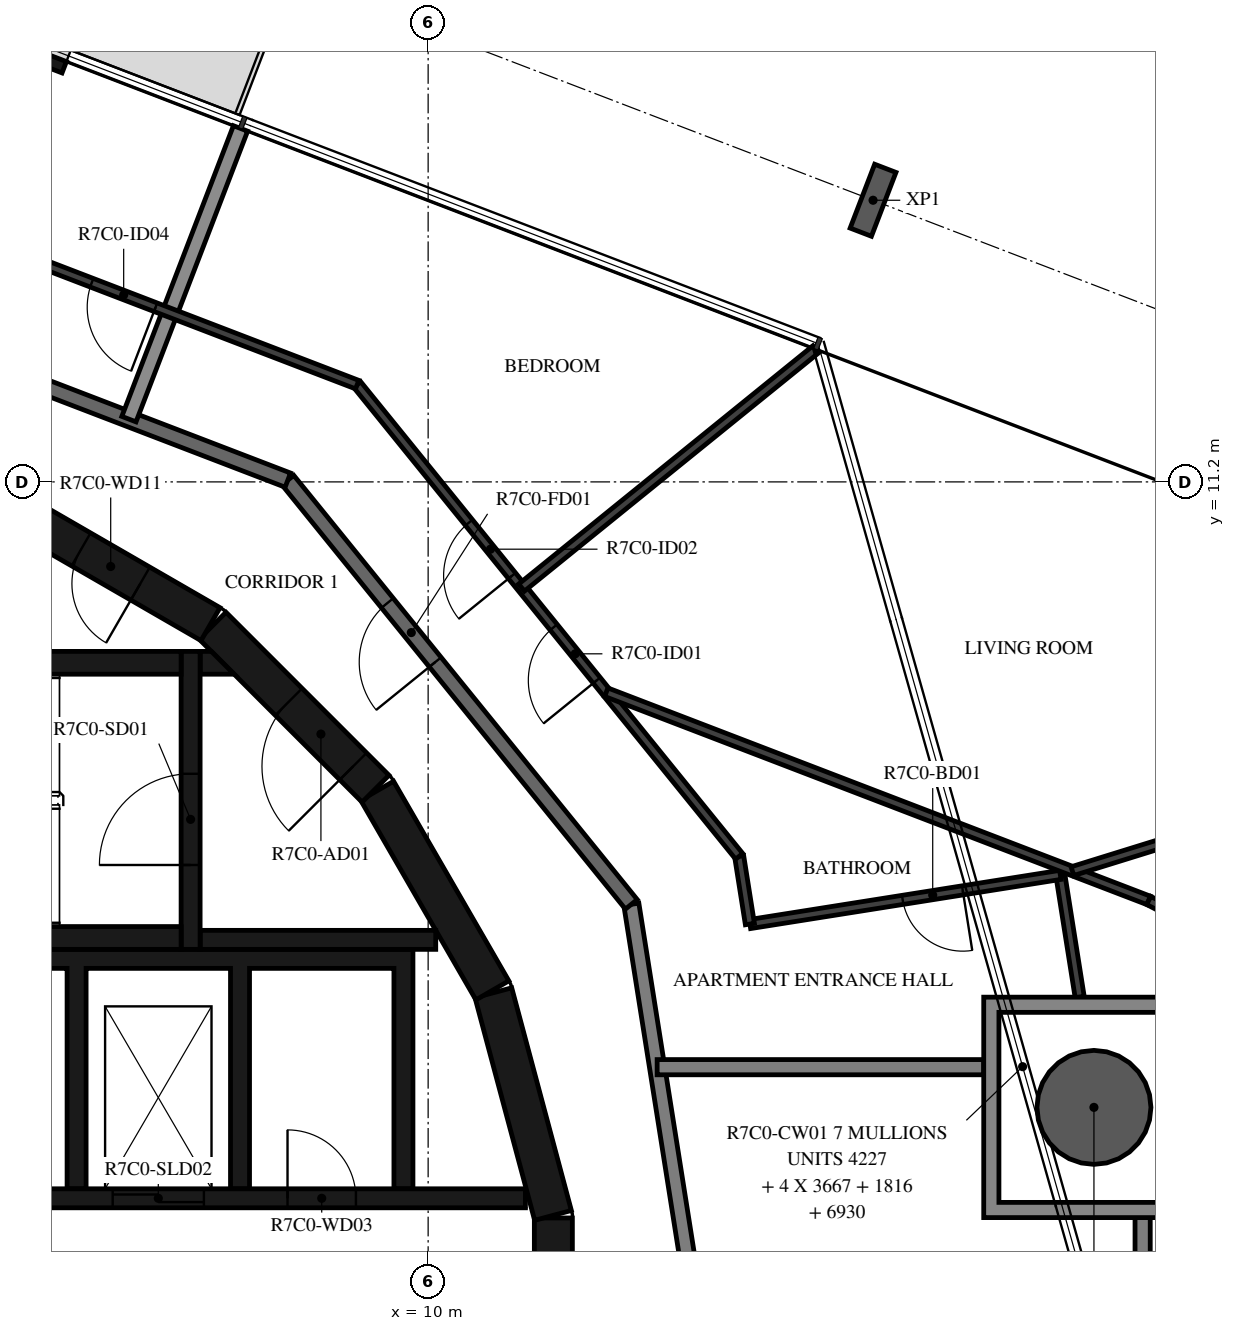
"""IFC4 building model, lengths in metres.
Left out: names, types, materials, properties, quantities, classifications, styles, units other than length and angle.
Written with IfcOpenShell. Run it as: python <this file> out.ifc"""

import sys

from ifc_helpers import new_model, si_unit, direction, frame, frame_2d, origin, origin_2d, place, context, subcontext, project, spatial, polyline, rectangle, hollow_circle, i_section, outline, extrude, element, fill, save


model = new_model("IFC4")
c1 = context("Model", 3, precision=1e-05, world=origin(), true_north=direction((0.0, 1.0)))
c2 = subcontext(c1, "Body", "Model", "MODEL_VIEW")
j1 = project(units=[si_unit("LENGTHUNIT", "METRE"), si_unit("PLANEANGLEUNIT", "RADIAN")], contexts=[c1])
p1 = place(None, origin())
s1 = spatial("IfcSite", under=j1, at=p1, CompositionType="ELEMENT")
p2 = place(p1, origin())
s2 = spatial("IfcBuilding", under=s1, at=p2, CompositionType="ELEMENT")
p3 = place(p2, frame((0.0, 0.0, 284.4)))
s3 = spatial("IfcBuildingStorey", under=s2, at=p3, CompositionType="ELEMENT", Elevation=284.4)
p4 = place(p3, frame((18.76, 2.971, -0.38), z_axis=(0.0, 0.0, 1.0), x_axis=(1.0, 0.0, 0.0)))
e1 = element("IfcColumn", 1, at=p4, inside=s3, PredefinedType="COLUMN", context=c2, shape_type="SweptSolid", body=[
    extrude(hollow_circle(Radius=0.75, WallThickness=0.035, at=origin_2d()), origin(), (0.0, 0.0, 1.0), 3.5),
])
p5 = place(p3, frame((15.854, 14.905, -0.38), z_axis=(0.0, 0.0, 1.0), x_axis=(0.933580354843, -0.35836813621, 0.0)))
e2 = element("IfcColumn", 2, at=p5, inside=s3, PredefinedType="COLUMN", context=c2, shape_type="SweptSolid", body=[
    extrude(i_section(OverallWidth=0.3, OverallDepth=0.9, WebThickness=0.019, FlangeThickness=0.035, FilletRadius=0.03, at=origin_2d()), origin(), (0.0, 0.0, 1.0), 3.5),
])
p6 = place(p3, frame((5.212, 16.655, 0.0), z_axis=(0.0, 0.0, 1.0), x_axis=(-0.933579413923, 0.358370587381, 0.0)))
e3 = element("IfcWall", 3, at=p6, inside=s3, PredefinedType="STANDARD", context=c2, shape_type="SweptSolid", body=[
    extrude(rectangle(XDim=3.2, YDim=0.16, at=frame_2d((1.6, 0.0))), origin(), (0.0, 0.0, 1.0), 3.12),
])
p7 = place(p6, frame((0.4, 0.0, 0.0)))
e4 = element("IfcOpeningElement", 4, at=p7, cuts=e3, PredefinedType="OPENING", context=c2, shape_type="SweptSolid", body=[
    extrude(rectangle(XDim=2.4, YDim=2.4, at=frame_2d((1.2, 1.2))), frame((0.0, 0.09, 0.0), z_axis=(0.0, -1.0, 0.0), x_axis=(1.0, 0.0, 0.0)), (0.0, 0.0, 1.0), 0.18),
])
p8 = place(p3, frame((11.647, -1.516, 0.0), z_axis=(0.0, 0.0, 1.0), x_axis=(0.0, 1.0, 0.0)))
e5 = element("IfcWall", 5, at=p8, inside=s3, PredefinedType="SHEAR", context=c2, shape_type="SweptSolid", body=[
    extrude(rectangle(XDim=3.033, YDim=0.5, at=frame_2d((1.516, 0.0))), origin(), (0.0, 0.0, 1.0), 3.12),
])
p9 = place(p8, frame((0.616, 0.0, 0.0)))
e6 = element("IfcOpeningElement", 6, at=p9, cuts=e5, PredefinedType="OPENING", context=c2, shape_type="SweptSolid", body=[
    extrude(rectangle(XDim=1.8, YDim=2.1, at=frame_2d((0.9, 1.05))), frame((0.0, 0.26, 0.0), z_axis=(0.0, -1.0, 0.0), x_axis=(1.0, 0.0, 0.0)), (0.0, 0.0, 1.0), 0.52),
])
for number, where, z_axis, x_axis in (
    (7, (11.643, 1.55, 0.0), (0.0, 0.0, 1.0), (-0.259, 0.966, 0.0)),
    (8, (10.845, 4.51, 0.0), (0.0, 0.0, 1.0), (-0.5, 0.866, 0.0)),
):
    element("IfcWall", number, at=place(p3, frame(where, z_axis=z_axis, x_axis=x_axis)), inside=s3, PredefinedType="SHEAR", context=c2, shape_type="SweptSolid", body=[
        extrude(rectangle(XDim=3.033, YDim=0.5, at=frame_2d((1.516, 0.0))), origin(), (0.0, 0.0, 1.0), 3.12),
    ])
p10 = place(p3, frame((9.308, 7.164, 0.0), z_axis=(0.0, 0.0, 1.0), x_axis=(-0.707106781187, 0.707106781187, 0.0)))
e9 = element("IfcWall", 9, at=p10, inside=s3, PredefinedType="SHEAR", context=c2, shape_type="SweptSolid", body=[
    extrude(rectangle(XDim=3.032, YDim=0.5, at=frame_2d((1.516, 0.0))), origin(), (0.0, 0.0, 1.0), 3.12),
])
p11 = place(p10, frame((0.416, 0.0, 0.0)))
e10 = element("IfcOpeningElement", 10, at=p11, cuts=e9, PredefinedType="OPENING", context=c2, shape_type="SweptSolid", body=[
    extrude(rectangle(XDim=1.2, YDim=2.1, at=frame_2d((0.6, 1.05))), frame((0.0, 0.26, 0.0), z_axis=(0.0, -1.0, 0.0), x_axis=(1.0, 0.0, 0.0)), (0.0, 0.0, 1.0), 0.52),
])
p12 = place(p3, frame((7.137, 9.329, 0.0), z_axis=(0.0, 0.0, 1.0), x_axis=(-0.865975092491, 0.500087131594, 0.0)))
e11 = element("IfcWall", 11, at=p12, inside=s3, PredefinedType="SHEAR", context=c2, shape_type="SweptSolid", body=[
    extrude(rectangle(XDim=3.033, YDim=0.5, at=frame_2d((1.516, 0.0))), origin(), (0.0, 0.0, 1.0), 3.12),
])
p13 = place(p12, frame((1.066, 0.0, 0.0)))
e12 = element("IfcOpeningElement", 12, at=p13, cuts=e11, PredefinedType="OPENING", context=c2, shape_type="SweptSolid", body=[
    extrude(rectangle(XDim=0.9, YDim=2.1, at=frame_2d((0.45, 1.05))), frame((0.0, 0.26, 0.0), z_axis=(0.0, -1.0, 0.0), x_axis=(1.0, 0.0, 0.0)), (0.0, 0.0, 1.0), 0.52),
])
for number, where, z_axis, x_axis in (
    (13, (0.0, 5.2, 0.0), (0.0, 0.0, 1.0), (1.0, 0.0, 0.0)),
    (14, (0.0, 8.82, 0.0), (0.0, 0.0, 1.0), (1.0, 0.0, 0.0)),
):
    element("IfcWall", number, at=place(p3, frame(where, z_axis=z_axis, x_axis=x_axis)), inside=s3, PredefinedType="SHEAR", context=c2, shape_type="SweptSolid", body=[
        extrude(rectangle(XDim=6.75, YDim=0.3, at=frame_2d((3.375, 0.0))), origin(), (0.0, 0.0, 1.0), 3.12),
    ])
p14 = place(p3, frame((6.875, 5.05, 0.0), z_axis=(0.0, 0.0, 1.0), x_axis=(0.0, 1.0, 0.0)))
e15 = element("IfcWall", 15, at=p14, inside=s3, PredefinedType="SHEAR", context=c2, shape_type="SweptSolid", body=[
    extrude(rectangle(XDim=3.92, YDim=0.25, at=frame_2d((1.96, 0.0))), origin(), (0.0, 0.0, 1.0), 3.12),
])
p15 = place(p14, frame((1.11, 0.0, 0.0)))
e16 = element("IfcOpeningElement", 16, at=p15, cuts=e15, PredefinedType="OPENING", context=c2, shape_type="SweptSolid", body=[
    extrude(rectangle(XDim=1.2, YDim=2.1, at=frame_2d((0.6, 1.05))), frame((0.0, 0.135, 0.0), z_axis=(0.0, -1.0, 0.0), x_axis=(1.0, 0.0, 0.0)), (0.0, 0.0, 1.0), 0.27),
])
p16 = place(p3, frame((7.0, 5.175, 0.0), z_axis=(0.0, 0.0, 1.0), x_axis=(1.0, 0.0, 0.0)))
e17 = element("IfcWall", 17, at=p16, inside=s3, PredefinedType="SHEAR", context=c2, shape_type="SweptSolid", body=[
    extrude(rectangle(XDim=3.1, YDim=0.25, at=frame_2d((1.55, 0.0))), origin(), (0.0, 0.0, 1.0), 3.12),
])
p17 = place(p3, origin())
e18 = element("IfcWall", 18, at=p17, inside=s3, PredefinedType="SHEAR", context=c2, shape_type="SweptSolid", body=[
    extrude(outline(polyline([(7.448, 8.67), (7.0, 8.67), (7.0, 8.97), (7.148, 8.97), (7.448, 8.67)])), origin(), (0.0, 0.0, 1.0), 3.12),
])
p18 = place(p3, origin())
e19 = element("IfcWall", 19, at=p18, inside=s3, PredefinedType="SHEAR", context=c2, shape_type="SweptSolid", body=[
    extrude(outline(polyline([(-9.8, 1.9), (-9.55, 1.9), (-9.55, 4.8), (-5.5, 4.8), (-5.5, 1.9), (-5.25, 1.9), (-5.25, 4.8), (3.1, 4.8), (3.1, 1.9), (3.35, 1.9), (3.35, 4.8), (5.25, 4.8), (5.25, 1.9), (5.5, 1.9), (5.5, 4.8), (7.4, 4.8), (7.4, 1.9), (7.65, 1.9), (7.65, 4.8), (9.55, 4.8), (9.55, 1.9), (9.8, 1.9), (9.8, 4.8), (9.8, 5.05), (-9.8, 5.05), (-9.8, 4.8), (-9.8, 1.9)])), origin(), (0.0, 0.0, 1.0), 3.12),
])
p19 = place(p3, frame((3.35, 1.775, 0.0), z_axis=(0.0, 0.0, 1.0), x_axis=(1.0, 0.0, 0.0)))
e20 = element("IfcWall", 20, at=p19, inside=s3, PredefinedType="SHEAR", context=c2, shape_type="SweptSolid", body=[
    extrude(rectangle(XDim=7.93, YDim=0.25, at=frame_2d((3.965, 0.0))), origin(), (0.0, 0.0, 1.0), 3.12),
])
p20 = place(p19, frame((0.35, 0.0, 0.0)))
e21 = element("IfcOpeningElement", 21, at=p20, cuts=e20, PredefinedType="OPENING", context=c2, shape_type="SweptSolid", body=[
    extrude(rectangle(XDim=1.2, YDim=2.4, at=frame_2d((0.6, 1.2))), frame((0.0, 0.135, 0.0), z_axis=(0.0, -1.0, 0.0), x_axis=(1.0, 0.0, 0.0)), (0.0, 0.0, 1.0), 0.27),
])
p21 = place(p19, frame((2.5, 0.0, 0.0)))
e22 = element("IfcOpeningElement", 22, at=p21, cuts=e20, PredefinedType="OPENING", context=c2, shape_type="SweptSolid", body=[
    extrude(rectangle(XDim=1.2, YDim=2.4, at=frame_2d((0.6, 1.2))), frame((0.0, 0.135, 0.0), z_axis=(0.0, -1.0, 0.0), x_axis=(1.0, 0.0, 0.0)), (0.0, 0.0, 1.0), 0.27),
])
p22 = place(p19, frame((4.8, 0.0, 0.0)))
e23 = element("IfcOpeningElement", 23, at=p22, cuts=e20, PredefinedType="OPENING", context=c2, shape_type="SweptSolid", body=[
    extrude(rectangle(XDim=0.9, YDim=2.1, at=frame_2d((0.45, 1.05))), frame((0.0, 0.135, 0.0), z_axis=(0.0, -1.0, 0.0), x_axis=(1.0, 0.0, 0.0)), (0.0, 0.0, 1.0), 0.27),
])
p23 = place(p3, frame((13.797, -1.45, 0.0), z_axis=(0.0, 0.0, 1.0), x_axis=(-0.156421704315, 0.987690361611, 0.0)))
e24 = element("IfcWall", 24, at=p23, inside=s3, PredefinedType="STANDARD", context=c2, shape_type="SweptSolid", body=[
    extrude(rectangle(XDim=7.181, YDim=0.2, at=frame_2d((3.591, 0.0))), origin(), (0.0, 0.0, 1.0), 3.12),
])
p24 = place(p3, frame((12.673, 5.643, 0.0), z_axis=(0.0, 0.0, 1.0), x_axis=(-0.629302871585, 0.777160148113, 0.0)))
e25 = element("IfcWall", 25, at=p24, inside=s3, PredefinedType="STANDARD", context=c2, shape_type="SweptSolid", body=[
    extrude(rectangle(XDim=7.181, YDim=0.2, at=frame_2d((3.59, 0.0))), origin(), (0.0, 0.0, 1.0), 3.12),
])
p25 = place(p24, frame((4.1, 0.0, 0.0)))
e26 = element("IfcOpeningElement", 26, at=p25, cuts=e25, PredefinedType="OPENING", context=c2, shape_type="SweptSolid", body=[
    extrude(rectangle(XDim=1.0, YDim=2.1, at=frame_2d((0.5, 1.05))), frame((0.0, 0.11, 0.0), z_axis=(0.0, -1.0, 0.0), x_axis=(1.0, 0.0, 0.0)), (0.0, 0.0, 1.0), 0.22),
])
p26 = place(p3, frame((8.154, 11.223, 0.0), z_axis=(0.0, 0.0, 1.0), x_axis=(-0.93359073609, 0.358341090983, 0.0)))
e27 = element("IfcWall", 27, at=p26, inside=s3, PredefinedType="STANDARD", context=c2, shape_type="SweptSolid", body=[
    extrude(rectangle(XDim=7.181, YDim=0.2, at=frame_2d((3.59, 0.0))), origin(), (0.0, 0.0, 1.0), 3.12),
])
p27 = place(p3, frame((17.309, 3.5, 0.0), z_axis=(0.0, 0.0, 1.0), x_axis=(-1.0, 0.0, 0.0)))
e28 = element("IfcWall", 28, at=p27, inside=s3, PredefinedType="STANDARD", context=c2, shape_type="SweptSolid", body=[
    extrude(rectangle(XDim=4.297, YDim=0.2, at=frame_2d((2.148, 0.0))), origin(), (0.0, 0.0, 1.0), 3.12),
])
p28 = place(p3, frame((19.4, -3.5, 0.0), z_axis=(0.0, 0.0, 1.0), x_axis=(0.0, 1.0, 0.0)))
e29 = element("IfcWall", 29, at=p28, inside=s3, PredefinedType="STANDARD", context=c2, shape_type="SweptSolid", body=[
    extrude(rectangle(XDim=5.021, YDim=0.2, at=frame_2d((2.511, 0.0))), origin(), (0.0, 0.0, 1.0), 3.12),
])
p29 = place(p3, frame((7.532, 15.85, 0.0), z_axis=(0.0, 0.0, 1.0), x_axis=(-0.358355996975, -0.933585014571, 0.0)))
e30 = element("IfcWall", 30, at=p29, inside=s3, PredefinedType="STANDARD", context=c2, shape_type="SweptSolid", body=[
    extrude(rectangle(XDim=4.096, YDim=0.2, at=frame_2d((2.048, 0.0))), origin(), (0.0, 0.0, 1.0), 2.73),
])
p30 = place(p3, frame((18.572, 4.421, 0.0), z_axis=(0.0, 0.0, 1.0), x_axis=(-0.156347444306, 0.987702119396, 0.0)))
e31 = element("IfcWall", 31, at=p30, inside=s3, PredefinedType="PARTITIONING", context=c2, shape_type="SweptSolid", body=[
    extrude(rectangle(XDim=1.629, YDim=0.12, at=frame_2d((0.814, 0.0))), origin(), (0.0, 0.0, 1.0), 3.12),
])
p31 = place(p3, frame((18.317, 6.03, 0.0), z_axis=(0.0, 0.0, 1.0), x_axis=(-0.9876848128, -0.156456737039, 0.0)))
e32 = element("IfcWall", 32, at=p31, inside=s3, PredefinedType="PARTITIONING", context=c2, shape_type="SweptSolid", body=[
    extrude(rectangle(XDim=4.135, YDim=0.12, at=frame_2d((2.068, 0.0))), origin(), (0.0, 0.0, 1.0), 3.12),
])
p32 = place(p31, frame((1.3, 0.0, 0.0)))
e33 = element("IfcOpeningElement", 33, at=p32, cuts=e32, PredefinedType="OPENING", context=c2, shape_type="SweptSolid", body=[
    extrude(rectangle(XDim=0.8, YDim=2.1, at=frame_2d((0.4, 1.05))), frame((0.0, 0.07, 0.0), z_axis=(0.0, -1.0, 0.0), x_axis=(1.0, 0.0, 0.0)), (0.0, 0.0, 1.0), 0.14),
])
p33 = place(p3, frame((14.233, 5.383, 0.0), z_axis=(0.0, 0.0, 1.0), x_axis=(-0.156365428504, 0.987699272435, 0.0)))
e34 = element("IfcWall", 34, at=p33, inside=s3, PredefinedType="PARTITIONING", context=c2, shape_type="SweptSolid", body=[
    extrude(rectangle(XDim=0.902, YDim=0.12, at=frame_2d((0.451, 0.0))), origin(), (0.0, 0.0, 1.0), 3.12),
])
p34 = place(p3, frame((14.092, 6.274, 0.0), z_axis=(0.0, 0.0, 1.0), x_axis=(-0.62933367237, 0.777135206268, 0.0)))
e35 = element("IfcWall", 35, at=p34, inside=s3, PredefinedType="PARTITIONING", context=c2, shape_type="SweptSolid", body=[
    extrude(rectangle(XDim=7.985, YDim=0.12, at=frame_2d((3.992, 0.0))), origin(), (0.0, 0.0, 1.0), 3.12),
])
p35 = place(p34, frame((2.978, 0.0, 0.0)))
e36 = element("IfcOpeningElement", 36, at=p35, cuts=e35, PredefinedType="OPENING", context=c2, shape_type="SweptSolid", body=[
    extrude(rectangle(XDim=0.9, YDim=2.1, at=frame_2d((0.45, 1.05))), frame((0.0, 0.07, 0.0), z_axis=(0.0, -1.0, 0.0), x_axis=(1.0, 0.0, 0.0)), (0.0, 0.0, 1.0), 0.14),
])
p36 = place(p34, frame((4.749, 0.0, 0.0)))
e37 = element("IfcOpeningElement", 37, at=p36, cuts=e35, PredefinedType="OPENING", context=c2, shape_type="SweptSolid", body=[
    extrude(rectangle(XDim=0.9, YDim=2.1, at=frame_2d((0.45, 1.05))), frame((0.0, 0.07, 0.0), z_axis=(0.0, -1.0, 0.0), x_axis=(1.0, 0.0, 0.0)), (0.0, 0.0, 1.0), 0.14),
])
p37 = place(p3, frame((9.067, 12.479, 0.0), z_axis=(0.0, 0.0, 1.0), x_axis=(-0.933579449035, 0.358370495911, 0.0)))
e38 = element("IfcWall", 38, at=p37, inside=s3, PredefinedType="PARTITIONING", context=c2, shape_type="SweptSolid", body=[
    extrude(rectangle(XDim=7.985, YDim=0.12, at=frame_2d((3.992, 0.0))), origin(), (0.0, 0.0, 1.0), 3.12),
])
p38 = place(p37, frame((2.841, 0.0, 0.0)))
e39 = element("IfcOpeningElement", 39, at=p38, cuts=e38, PredefinedType="OPENING", context=c2, shape_type="SweptSolid", body=[
    extrude(rectangle(XDim=0.9, YDim=2.1, at=frame_2d((0.45, 1.05))), frame((0.0, 0.07, 0.0), z_axis=(0.0, -1.0, 0.0), x_axis=(1.0, 0.0, 0.0)), (0.0, 0.0, 1.0), 0.14),
])
p39 = place(p3, frame((12.344, 8.433, 0.0), z_axis=(0.0, 0.0, 1.0), x_axis=(0.933573435176, -0.358386162029, 0.0)))
e40 = element("IfcWall", 40, at=p39, inside=s3, PredefinedType="PARTITIONING", context=c2, shape_type="SweptSolid", body=[
    extrude(rectangle(XDim=7.644, YDim=0.12, at=frame_2d((3.822, 0.0))), origin(), (0.0, 0.0, 1.0), 3.12),
])
p40 = place(p3, frame((19.48, 5.694, 0.0), z_axis=(0.0, 0.0, 1.0), x_axis=(0.885755816688, -0.464151519662, 0.0)))
e41 = element("IfcWall", 41, at=p40, inside=s3, PredefinedType="PARTITIONING", context=c2, shape_type="SweptSolid", body=[
    extrude(rectangle(XDim=0.947, YDim=0.12, at=frame_2d((0.473, 0.0))), origin(), (0.0, 0.0, 1.0), 3.12),
])
p41 = place(p3, frame((24.883, 8.066, 0.0), z_axis=(0.0, 0.0, 1.0), x_axis=(-0.955106049863, -0.296264127958, 0.0)))
e42 = element("IfcWall", 42, at=p41, inside=s3, PredefinedType="PARTITIONING", context=c2, shape_type="SweptSolid", body=[
    extrude(rectangle(XDim=6.708, YDim=0.12, at=frame_2d((3.354, 0.0))), origin(), (0.0, 0.0, 1.0), 3.12),
])
p42 = place(p41, frame((0.4, 0.0, 0.0)))
e43 = element("IfcOpeningElement", 43, at=p42, cuts=e42, PredefinedType="OPENING", context=c2, shape_type="SweptSolid", body=[
    extrude(rectangle(XDim=0.9, YDim=2.1, at=frame_2d((0.45, 1.05))), frame((0.0, 0.07, 0.0), z_axis=(0.0, -1.0, 0.0), x_axis=(1.0, 0.0, 0.0)), (0.0, 0.0, 1.0), 0.14),
])
p43 = place(p3, frame((15.101, 12.945, 0.0), z_axis=(0.0, 0.0, 1.0), x_axis=(-0.777178675378, -0.629279990575, 0.0)))
e44 = element("IfcWall", 44, at=p43, inside=s3, PredefinedType="PARTITIONING", context=c2, shape_type="SweptSolid", body=[
    extrude(rectangle(XDim=4.982, YDim=0.12, at=frame_2d((2.491, 0.0))), origin(), (0.0, 0.0, 1.0), 3.12),
])
p44 = place(p3, origin())
e45 = element("IfcWall", 45, at=p44, inside=s3, PredefinedType="STANDARD", context=c2, shape_type="SweptSolid", body=[
    extrude(outline(polyline([(20.209, 4.421), (20.209, 1.521), (17.309, 1.521), (17.309, 4.421), (20.209, 4.421)]), holes=[polyline([(17.51, 1.721), (20.01, 1.721), (20.01, 4.221), (17.51, 4.221), (17.51, 1.721)])]), origin(), (0.0, 0.0, 1.0), 3.12),
])
p45 = place(p15, origin())
e46 = element("IfcDoor", 46, at=p45, inside=s3, OperationType="SINGLE_SWING_LEFT", PredefinedType="DOOR", context=c2, shape_type="SweptSolid", body=[
    extrude(rectangle(XDim=1.2, YDim=2.1, at=frame_2d((0.6, 1.05))), frame((0.0, 0.025, 0.0), z_axis=(0.0, -1.0, 0.0), x_axis=(1.0, 0.0, 0.0)), (0.0, 0.0, 1.0), 0.05),
])
fill(e16, e46)
p46 = place(p11, origin())
e47 = element("IfcDoor", 47, at=p46, inside=s3, OperationType="SINGLE_SWING_RIGHT", PredefinedType="DOOR", context=c2, shape_type="SweptSolid", body=[
    extrude(rectangle(XDim=1.2, YDim=2.1, at=frame_2d((0.6, 1.05))), frame((0.0, 0.025, 0.0), z_axis=(0.0, -1.0, 0.0), x_axis=(1.0, 0.0, 0.0)), (0.0, 0.0, 1.0), 0.05),
])
fill(e10, e47)
p47 = place(p21, origin())
e48 = element("IfcDoor", 48, at=p47, inside=s3, OperationType="DOUBLE_DOOR_SLIDING", PredefinedType="DOOR", context=c2, shape_type="SweptSolid", body=[
    extrude(rectangle(XDim=1.2, YDim=2.4, at=frame_2d((0.6, 1.2))), frame((0.0, 0.025, 0.0), z_axis=(0.0, -1.0, 0.0), x_axis=(1.0, 0.0, 0.0)), (0.0, 0.0, 1.0), 0.05),
])
fill(e22, e48)
p48 = place(p22, origin())
e49 = element("IfcDoor", 49, at=p48, inside=s3, OperationType="SINGLE_SWING_LEFT", PredefinedType="DOOR", context=c2, shape_type="SweptSolid", body=[
    extrude(rectangle(XDim=0.9, YDim=2.1, at=frame_2d((0.45, 1.05))), frame((0.0, 0.025, 0.0), z_axis=(0.0, -1.0, 0.0), x_axis=(1.0, 0.0, 0.0)), (0.0, 0.0, 1.0), 0.05),
])
fill(e23, e49)
p49 = place(p13, origin())
e50 = element("IfcDoor", 50, at=p49, inside=s3, OperationType="SINGLE_SWING_LEFT", PredefinedType="DOOR", context=c2, shape_type="SweptSolid", body=[
    extrude(rectangle(XDim=0.9, YDim=2.1, at=frame_2d((0.45, 1.05))), frame((0.0, 0.025, 0.0), z_axis=(0.0, -1.0, 0.0), x_axis=(1.0, 0.0, 0.0)), (0.0, 0.0, 1.0), 0.05),
])
fill(e12, e50)
p50 = place(p25, origin())
e51 = element("IfcDoor", 51, at=p50, inside=s3, OperationType="SINGLE_SWING_LEFT", PredefinedType="DOOR", context=c2, shape_type="SweptSolid", body=[
    extrude(rectangle(XDim=1.0, YDim=2.1, at=frame_2d((0.5, 1.05))), frame((0.0, 0.025, 0.0), z_axis=(0.0, -1.0, 0.0), x_axis=(1.0, 0.0, 0.0)), (0.0, 0.0, 1.0), 0.05),
])
fill(e26, e51)
p51 = place(p32, origin())
e52 = element("IfcDoor", 52, at=p51, inside=s3, OperationType="SINGLE_SWING_LEFT", PredefinedType="DOOR", context=c2, shape_type="SweptSolid", body=[
    extrude(rectangle(XDim=0.8, YDim=2.1, at=frame_2d((0.4, 1.05))), frame((0.0, 0.025, 0.0), z_axis=(0.0, -1.0, 0.0), x_axis=(1.0, 0.0, 0.0)), (0.0, 0.0, 1.0), 0.05),
])
fill(e33, e52)
p52 = place(p35, origin())
e53 = element("IfcDoor", 53, at=p52, inside=s3, OperationType="SINGLE_SWING_LEFT", PredefinedType="DOOR", context=c2, shape_type="SweptSolid", body=[
    extrude(rectangle(XDim=0.9, YDim=2.1, at=frame_2d((0.45, 1.05))), frame((0.0, 0.025, 0.0), z_axis=(0.0, -1.0, 0.0), x_axis=(1.0, 0.0, 0.0)), (0.0, 0.0, 1.0), 0.05),
])
fill(e36, e53)
p53 = place(p36, origin())
e54 = element("IfcDoor", 54, at=p53, inside=s3, OperationType="SINGLE_SWING_LEFT", PredefinedType="DOOR", context=c2, shape_type="SweptSolid", body=[
    extrude(rectangle(XDim=0.9, YDim=2.1, at=frame_2d((0.45, 1.05))), frame((0.0, 0.025, 0.0), z_axis=(0.0, -1.0, 0.0), x_axis=(1.0, 0.0, 0.0)), (0.0, 0.0, 1.0), 0.05),
])
fill(e37, e54)
p54 = place(p38, origin())
e55 = element("IfcDoor", 55, at=p54, inside=s3, OperationType="SINGLE_SWING_LEFT", PredefinedType="DOOR", context=c2, shape_type="SweptSolid", body=[
    extrude(rectangle(XDim=0.9, YDim=2.1, at=frame_2d((0.45, 1.05))), frame((0.0, 0.025, 0.0), z_axis=(0.0, -1.0, 0.0), x_axis=(1.0, 0.0, 0.0)), (0.0, 0.0, 1.0), 0.05),
])
fill(e39, e55)
save(model, sys.argv[1])
